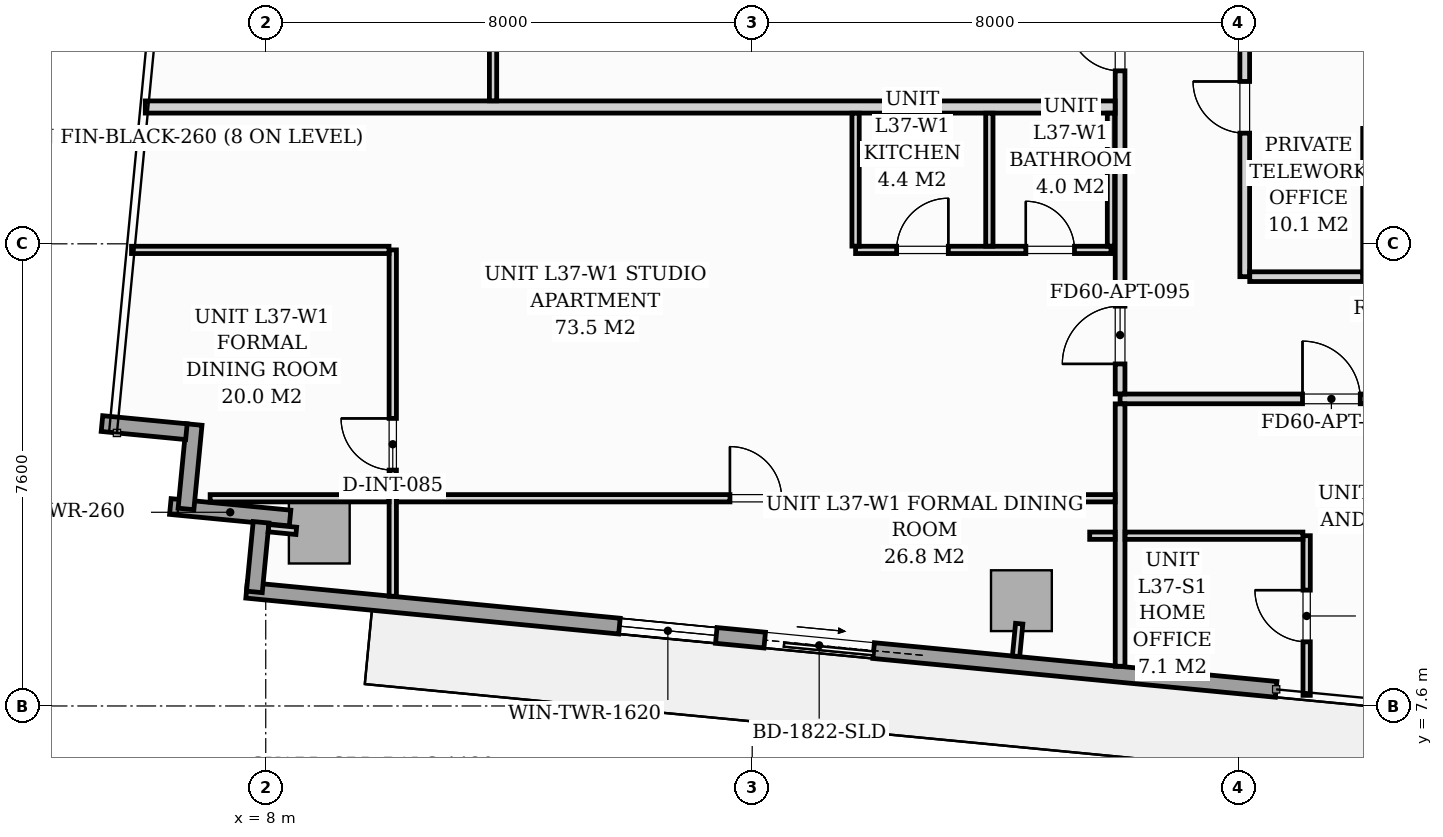
"""IFC4 building model, lengths in metres.
Left out: names, types, materials, properties, quantities, classifications, styles, units other than length and angle.
Written with IfcOpenShell. Run it as: python <this file> out.ifc"""

import sys

from ifc_helpers import new_model, si_unit, direction, frame, frame_2d, origin, origin_2d, place, context, subcontext, project, spatial, rectangle, extrude, source, transform, mapped, element, fill, save


model = new_model("IFC4")
c1 = context("Model", 3, precision=1e-05, world=origin(), true_north=direction((0.0, 1.0)))
c2 = subcontext(c1, "Body", "Model", "MODEL_VIEW")
j1 = project(units=[si_unit("LENGTHUNIT", "METRE"), si_unit("PLANEANGLEUNIT", "RADIAN")], contexts=[c1])
p1 = place(None, origin())
s1 = spatial("IfcSite", under=j1, at=p1, CompositionType="ELEMENT")
p2 = place(p1, origin())
s2 = spatial("IfcBuilding", under=s1, at=p2, CompositionType="ELEMENT")
p3 = place(p2, frame((0.0, 0.0, 131.0)))
s3 = spatial("IfcBuildingStorey", under=s2, at=p3, CompositionType="ELEMENT", Elevation=131.0)
m1 = source(origin(), c2, "Body", "SweptSolid", [
    extrude(rectangle(XDim=1.0, YDim=1.0, at=origin_2d()), origin(), (0.0, 0.0, 1.0), 3.196),
])
for number, where, z_axis, x_axis in (
    (1, (8.881, 10.443, 0.002), (0.0, 0.0, 1.0), (0.995, -0.096, 0.0)),
    (2, (20.427, 9.332, 0.002), (0.0, 0.0, 1.0), (0.995, -0.096, 0.0)),
):
    element("IfcColumn", number, at=place(p3, frame(where, z_axis=z_axis, x_axis=x_axis)), inside=s3, PredefinedType="COLUMN", context=c2, shape_type="MappedRepresentation", body=[
        mapped(m1, transform((0.0, 0.0, 0.0), scale=1.0)),
    ])
p4 = place(p3, frame((8.4, 10.69, 0.0), z_axis=(0.0, 0.0, 1.0), x_axis=(-0.995391147587, 0.095898192396, 0.0)))
e3 = element("IfcWall", 3, at=p4, inside=s3, PredefinedType="STANDARD", context=c2, shape_type="SweptSolid", body=[
    extrude(rectangle(XDim=1.978, YDim=0.26, at=frame_2d((0.989, 0.0))), origin(), (0.0, 0.0, 1.0), 2.94),
])
p5 = place(p3, frame((6.688, 10.84, 0.0), z_axis=(0.0, 0.0, 1.0), x_axis=(0.09589913835, 0.995391056452, 0.0)))
e4 = element("IfcWall", 4, at=p5, inside=s3, PredefinedType="STANDARD", context=c2, shape_type="SweptSolid", body=[
    extrude(rectangle(XDim=1.395, YDim=0.26, at=frame_2d((0.698, 0.0))), origin(), (0.0, 0.0, 1.0), 2.94),
])
p6 = place(p3, frame((6.695, 12.111, 0.0), z_axis=(0.0, 0.0, 1.0), x_axis=(-0.99540614245, 0.095742423056, 0.0)))
e5 = element("IfcWall", 5, at=p6, inside=s3, PredefinedType="STANDARD", context=c2, shape_type="SweptSolid", body=[
    extrude(rectangle(XDim=1.395, YDim=0.26, at=frame_2d((0.697, 0.0))), origin(), (0.0, 0.0, 1.0), 2.94),
])
p7 = place(p3, frame((24.617, 7.873, 0.0), z_axis=(0.0, 0.0, 1.0), x_axis=(-0.995395976631, 0.095848055311, 0.0)))
e6 = element("IfcWall", 6, at=p7, inside=s3, PredefinedType="STANDARD", context=c2, shape_type="SweptSolid", body=[
    extrude(rectangle(XDim=17.01, YDim=0.26, at=frame_2d((8.505, 0.0))), origin(), (0.0, 0.0, 1.0), 2.94),
])
p8 = place(p7, frame((6.65, 0.0, 0.0)))
e7 = element("IfcOpeningElement", 7, at=p8, cuts=e6, PredefinedType="OPENING", context=c2, shape_type="SweptSolid", body=[
    extrude(rectangle(XDim=1.8, YDim=2.06, at=frame_2d((0.9, 1.03))), frame((0.0, 0.14, 0.0), z_axis=(0.0, -1.0, 0.0), x_axis=(1.0, 0.0, 0.0)), (0.0, 0.0, 1.0), 0.28),
])
p9 = place(p7, frame((9.25, 0.0, 0.65)))
e8 = element("IfcOpeningElement", 8, at=p9, cuts=e6, PredefinedType="OPENING", context=c2, shape_type="SweptSolid", body=[
    extrude(rectangle(XDim=1.6, YDim=1.5, at=frame_2d((0.8, 0.75))), frame((0.0, 0.14, 0.0), z_axis=(0.0, -1.0, 0.0), x_axis=(1.0, 0.0, 0.0)), (0.0, 0.0, 1.0), 0.28),
])
p10 = place(p3, frame((7.813, 9.476, 0.0), z_axis=(0.0, 0.0, 1.0), x_axis=(0.09576095695, 0.995404359607, 0.0)))
e9 = element("IfcWall", 9, at=p10, inside=s3, PredefinedType="STANDARD", context=c2, shape_type="SweptSolid", body=[
    extrude(rectangle(XDim=1.15, YDim=0.26, at=frame_2d((0.575, 0.0))), origin(), (0.0, 0.0, 1.0), 2.94),
])
p11 = place(p3, frame((22.05, 12.65, 0.0), z_axis=(0.0, 0.0, 1.0), x_axis=(1.0, 0.0, 0.0)))
e10 = element("IfcWall", 10, at=p11, inside=s3, PredefinedType="PARTITIONING", context=c2, shape_type="SweptSolid", body=[
    extrude(rectangle(XDim=23.83, YDim=0.16, at=frame_2d((11.915, 0.0))), origin(), (0.0, 0.0, 1.0), 2.94),
])
p12 = place(p11, frame((3.0, 0.0, 0.0)))
e11 = element("IfcOpeningElement", 11, at=p12, cuts=e10, PredefinedType="OPENING", context=c2, shape_type="SweptSolid", body=[
    extrude(rectangle(XDim=0.95, YDim=2.06, at=frame_2d((0.475, 1.03))), frame((0.0, 0.09, 0.0), z_axis=(0.0, -1.0, 0.0), x_axis=(1.0, 0.0, 0.0)), (0.0, 0.0, 1.0), 0.18),
])
p13 = place(p11, frame((15.485, 0.0, 0.0)))
e12 = element("IfcOpeningElement", 12, at=p13, cuts=e10, PredefinedType="OPENING", context=c2, shape_type="SweptSolid", body=[
    extrude(rectangle(XDim=0.95, YDim=2.06, at=frame_2d((0.475, 1.03))), frame((0.0, 0.09, 0.0), z_axis=(0.0, -1.0, 0.0), x_axis=(1.0, 0.0, 0.0)), (0.0, 0.0, 1.0), 0.18),
])
p14 = place(p3, frame((22.05, 8.253, 0.0), z_axis=(0.0, 0.0, 1.0), x_axis=(0.0, 1.0, 0.0)))
e13 = element("IfcWall", 13, at=p14, inside=s3, PredefinedType="PARTITIONING", context=c2, shape_type="SweptSolid", body=[
    extrude(rectangle(XDim=4.315, YDim=0.16, at=frame_2d((2.157, 0.0))), origin(), (0.0, 0.0, 1.0), 2.94),
])
p15 = place(p3, frame((22.05, 12.732, 0.0), z_axis=(0.0, 0.0, 1.0), x_axis=(0.0, 1.0, 0.0)))
e14 = element("IfcWall", 14, at=p15, inside=s3, PredefinedType="PARTITIONING", context=c2, shape_type="SweptSolid", body=[
    extrude(rectangle(XDim=14.685, YDim=0.16, at=frame_2d((7.343, 0.0))), origin(), (0.0, 0.0, 1.0), 2.94),
])
p16 = place(p15, frame((0.493, 0.0, 0.0)))
e15 = element("IfcOpeningElement", 15, at=p16, cuts=e14, PredefinedType="OPENING", context=c2, shape_type="SweptSolid", body=[
    extrude(rectangle(XDim=0.95, YDim=2.06, at=frame_2d((0.475, 1.03))), frame((0.0, 0.09, 0.0), z_axis=(0.0, -1.0, 0.0), x_axis=(1.0, 0.0, 0.0)), (0.0, 0.0, 1.0), 0.18),
])
p17 = place(p15, frame((5.313, 0.0, 0.0)))
e16 = element("IfcOpeningElement", 16, at=p17, cuts=e14, PredefinedType="OPENING", context=c2, shape_type="SweptSolid", body=[
    extrude(rectangle(XDim=0.85, YDim=2.0, at=frame_2d((0.425, 1.0))), frame((0.0, 0.09, 0.0), z_axis=(0.0, -1.0, 0.0), x_axis=(1.0, 0.0, 0.0)), (0.0, 0.0, 1.0), 0.18),
])
p18 = place(p3, frame((25.118, 7.775, 0.0), z_axis=(0.0, 0.0, 1.0), x_axis=(0.0, 1.0, 0.0)))
e17 = element("IfcWall", 17, at=p18, inside=s3, PredefinedType="PARTITIONING", context=c2, shape_type="SweptSolid", body=[
    extrude(rectangle(XDim=2.625, YDim=0.12, at=frame_2d((1.312, 0.0))), origin(), (0.0, 0.0, 1.0), 2.94),
])
p19 = place(p18, frame((0.88, 0.0, 0.0)))
e18 = element("IfcOpeningElement", 18, at=p19, cuts=e17, PredefinedType="OPENING", context=c2, shape_type="SweptSolid", body=[
    extrude(rectangle(XDim=0.85, YDim=2.05, at=frame_2d((0.425, 1.025))), frame((0.0, 0.07, 0.0), z_axis=(0.0, -1.0, 0.0), x_axis=(1.0, 0.0, 0.0)), (0.0, 0.0, 1.0), 0.14),
])
p20 = place(p3, frame((21.55, 10.4, 0.0), z_axis=(0.0, 0.0, 1.0), x_axis=(1.0, 0.0, 0.0)))
e19 = element("IfcWall", 19, at=p20, inside=s3, PredefinedType="PARTITIONING", context=c2, shape_type="SweptSolid", body=[
    extrude(rectangle(XDim=0.418, YDim=0.12, at=frame_2d((0.209, 0.0))), origin(), (0.0, 0.0, 1.0), 2.94),
])
p21 = place(p3, frame((22.132, 10.4, 0.0), z_axis=(0.0, 0.0, 1.0), x_axis=(1.0, 0.0, 0.0)))
e20 = element("IfcWall", 20, at=p21, inside=s3, PredefinedType="PARTITIONING", context=c2, shape_type="SweptSolid", body=[
    extrude(rectangle(XDim=2.924, YDim=0.12, at=frame_2d((1.462, 0.0))), origin(), (0.0, 0.0, 1.0), 2.94),
])
p22 = place(p3, frame((6.019, 17.45, 0.0), z_axis=(0.0, 0.0, 1.0), x_axis=(1.0, 0.0, 0.0)))
e21 = element("IfcWall", 21, at=p22, inside=s3, PredefinedType="PARTITIONING", context=c2, shape_type="SweptSolid", body=[
    extrude(rectangle(XDim=15.949, YDim=0.2, at=frame_2d((7.975, 0.0))), origin(), (0.0, 0.0, 1.0), 2.94),
])
p23 = place(p3, frame((17.7, 15.1, 0.0), z_axis=(0.0, 0.0, 1.0), x_axis=(1.0, 0.0, 0.0)))
e22 = element("IfcWall", 22, at=p23, inside=s3, PredefinedType="PARTITIONING", context=c2, shape_type="SweptSolid", body=[
    extrude(rectangle(XDim=4.2, YDim=0.12, at=frame_2d((2.1, 0.0))), origin(), (0.0, 0.0, 1.0), 2.94),
])
p24 = place(p23, frame((0.675, 0.0, 0.0)))
e23 = element("IfcOpeningElement", 23, at=p24, cuts=e22, PredefinedType="OPENING", context=c2, shape_type="SweptSolid", body=[
    extrude(rectangle(XDim=0.85, YDim=2.05, at=frame_2d((0.425, 1.025))), frame((0.0, 0.07, 0.0), z_axis=(0.0, -1.0, 0.0), x_axis=(1.0, 0.0, 0.0)), (0.0, 0.0, 1.0), 0.14),
])
p25 = place(p23, frame((2.8, 0.0, 0.0)))
e24 = element("IfcOpeningElement", 24, at=p25, cuts=e22, PredefinedType="OPENING", context=c2, shape_type="SweptSolid", body=[
    extrude(rectangle(XDim=0.8, YDim=2.02, at=frame_2d((0.4, 1.01))), frame((0.0, 0.07, 0.0), z_axis=(0.0, -1.0, 0.0), x_axis=(1.0, 0.0, 0.0)), (0.0, 0.0, 1.0), 0.14),
])
for number, where, z_axis, x_axis in (
    (25, (17.7, 15.162, 0.0), (0.0, 0.0, 1.0), (0.0, 1.0, 0.0)),
    (26, (19.9, 15.162, 0.0), (0.0, 0.0, 1.0), (0.0, 1.0, 0.0)),
    (27, (21.9, 15.162, 0.0), (0.0, 0.0, 1.0), (0.0, 1.0, 0.0)),
):
    element("IfcWall", number, at=place(p3, frame(where, z_axis=z_axis, x_axis=x_axis)), inside=s3, PredefinedType="PARTITIONING", context=c2, shape_type="SweptSolid", body=[
        extrude(rectangle(XDim=2.186, YDim=0.12, at=frame_2d((1.093, 0.0))), origin(), (0.0, 0.0, 1.0), 2.94),
    ])
p26 = place(p3, frame((10.089, 9.405, 0.0), z_axis=(0.0, 0.0, 1.0), x_axis=(0.0, 1.0, 0.0)))
e28 = element("IfcWall", 28, at=p26, inside=s3, PredefinedType="PARTITIONING", context=c2, shape_type="SweptSolid", body=[
    extrude(rectangle(XDim=5.695, YDim=0.12, at=frame_2d((2.848, 0.0))), origin(), (0.0, 0.0, 1.0), 2.94),
])
p27 = place(p26, frame((2.074, 0.0, 0.0)))
e29 = element("IfcOpeningElement", 29, at=p27, cuts=e28, PredefinedType="OPENING", context=c2, shape_type="SweptSolid", body=[
    extrude(rectangle(XDim=0.85, YDim=2.05, at=frame_2d((0.425, 1.025))), frame((0.0, 0.07, 0.0), z_axis=(0.0, -1.0, 0.0), x_axis=(1.0, 0.0, 0.0)), (0.0, 0.0, 1.0), 0.14),
])
p28 = place(p3, frame((5.793, 15.1, 0.0), z_axis=(0.0, 0.0, 1.0), x_axis=(1.0, 0.0, 0.0)))
e30 = element("IfcWall", 30, at=p28, inside=s3, PredefinedType="PARTITIONING", context=c2, shape_type="SweptSolid", body=[
    extrude(rectangle(XDim=4.234, YDim=0.12, at=frame_2d((2.117, 0.0))), origin(), (0.0, 0.0, 1.0), 2.94),
])
p29 = place(p3, frame((7.086, 11.016, 0.0), z_axis=(0.0, 0.0, 1.0), x_axis=(1.0, 0.0, 0.0)))
e31 = element("IfcWall", 31, at=p29, inside=s3, PredefinedType="PARTITIONING", context=c2, shape_type="SweptSolid", body=[
    extrude(rectangle(XDim=2.941, YDim=0.12, at=frame_2d((1.471, 0.0))), origin(), (0.0, 0.0, 1.0), 2.94),
])
p30 = place(p3, frame((10.151, 11.016, 0.0), z_axis=(0.0, 0.0, 1.0), x_axis=(1.0, 0.0, 0.0)))
e32 = element("IfcWall", 32, at=p30, inside=s3, PredefinedType="PARTITIONING", context=c2, shape_type="SweptSolid", body=[
    extrude(rectangle(XDim=11.817, YDim=0.12, at=frame_2d((5.909, 0.0))), origin(), (0.0, 0.0, 1.0), 2.94),
])
p31 = place(p30, frame((5.483, 0.0, 0.0)))
e33 = element("IfcOpeningElement", 33, at=p31, cuts=e32, PredefinedType="OPENING", context=c2, shape_type="SweptSolid", body=[
    extrude(rectangle(XDim=0.85, YDim=2.05, at=frame_2d((0.425, 1.025))), frame((0.0, 0.07, 0.0), z_axis=(0.0, -1.0, 0.0), x_axis=(1.0, 0.0, 0.0)), (0.0, 0.0, 1.0), 0.14),
])
p32 = place(p3, frame((11.738, 17.552, 0.0), z_axis=(0.0, 0.0, 1.0), x_axis=(0.0, 1.0, 0.0)))
e34 = element("IfcWall", 34, at=p32, inside=s3, PredefinedType="PARTITIONING", context=c2, shape_type="SweptSolid", body=[
    extrude(rectangle(XDim=7.654, YDim=0.12, at=frame_2d((3.827, 0.0))), origin(), (0.0, 0.0, 1.0), 2.94),
])
p33 = place(p32, frame((3.402, 0.0, 0.0)))
e35 = element("IfcOpeningElement", 35, at=p33, cuts=e34, PredefinedType="OPENING", context=c2, shape_type="SweptSolid", body=[
    extrude(rectangle(XDim=0.85, YDim=2.05, at=frame_2d((0.425, 1.025))), frame((0.0, 0.07, 0.0), z_axis=(0.0, -1.0, 0.0), x_axis=(1.0, 0.0, 0.0)), (0.0, 0.0, 1.0), 0.14),
])
p34 = place(p3, frame((24.1, 14.66, 0.0), z_axis=(0.0, 0.0, 1.0), x_axis=(0.0, 1.0, 0.0)))
e36 = element("IfcWall", 36, at=p34, inside=s3, PredefinedType="PARTITIONING", context=c2, shape_type="SweptSolid", body=[
    extrude(rectangle(XDim=5.59, YDim=0.16, at=frame_2d((2.795, 0.0))), origin(), (0.0, 0.0, 1.0), 2.94),
])
p35 = place(p34, frame((2.36, 0.0, 0.0)))
e37 = element("IfcOpeningElement", 37, at=p35, cuts=e36, PredefinedType="OPENING", context=c2, shape_type="SweptSolid", body=[
    extrude(rectangle(XDim=0.85, YDim=2.0, at=frame_2d((0.425, 1.0))), frame((0.0, 0.09, 0.0), z_axis=(0.0, -1.0, 0.0), x_axis=(1.0, 0.0, 0.0)), (0.0, 0.0, 1.0), 0.18),
])
p36 = place(p3, frame((26.12, 14.66, 0.0), z_axis=(0.0, 0.0, 1.0), x_axis=(0.0, 1.0, 0.0)))
e38 = element("IfcWall", 38, at=p36, inside=s3, PredefinedType="PARTITIONING", context=c2, shape_type="SweptSolid", body=[
    extrude(rectangle(XDim=2.438, YDim=0.16, at=frame_2d((1.219, 0.0))), origin(), (0.0, 0.0, 1.0), 2.94),
])
p37 = place(p3, frame((24.182, 14.66, 0.0), z_axis=(0.0, 0.0, 1.0), x_axis=(1.0, 0.0, 0.0)))
e39 = element("IfcWall", 39, at=p37, inside=s3, PredefinedType="PARTITIONING", context=c2, shape_type="SweptSolid", body=[
    extrude(rectangle(XDim=1.856, YDim=0.16, at=frame_2d((0.928, 0.0))), origin(), (0.0, 0.0, 1.0), 2.94),
])
p38 = place(p3, frame((8.502, 10.48, 0.0), z_axis=(0.0, 0.0, 1.0), x_axis=(-0.995384576284, 0.09596637586, 0.0)))
e40 = element("IfcWall", 40, at=p38, inside=s3, PredefinedType="PARTITIONING", context=c2, shape_type="SweptSolid", body=[
    extrude(rectangle(XDim=0.458, YDim=0.12, at=frame_2d((0.229, 0.0))), origin(), (0.0, 0.0, 1.0), 2.94),
])
p39 = place(p3, frame((20.391, 8.953, 0.0), z_axis=(0.0, 0.0, 1.0), x_axis=(-0.096222656154, -0.995359834654, 0.0)))
e41 = element("IfcWall", 41, at=p39, inside=s3, PredefinedType="PARTITIONING", context=c2, shape_type="SweptSolid", body=[
    extrude(rectangle(XDim=0.538, YDim=0.12, at=frame_2d((0.269, 0.0))), origin(), (0.0, 0.0, 1.0), 2.94),
])
m2 = source(origin(), c2, "Body", "SweptSolid", [
    extrude(rectangle(XDim=1.8, YDim=2.06, at=frame_2d((0.9, 1.03))), frame((0.0, 0.025, 0.0), z_axis=(0.0, -1.0, 0.0), x_axis=(1.0, 0.0, 0.0)), (0.0, 0.0, 1.0), 0.05),
])
p40 = place(p8, origin())
e42 = element("IfcDoor", 42, at=p40, inside=s3, OperationType="SLIDING_TO_LEFT", PredefinedType="DOOR", context=c2, shape_type="MappedRepresentation", body=[
    mapped(m2, transform((0.0, 0.0, 0.0), scale=1.0)),
])
fill(e7, e42)
m3 = source(origin(), c2, "Body", "SweptSolid", [
    extrude(rectangle(XDim=1.6, YDim=1.5, at=frame_2d((0.8, 0.75))), frame((0.0, 0.03, 0.0), z_axis=(0.0, -1.0, 0.0), x_axis=(1.0, 0.0, 0.0)), (0.0, 0.0, 1.0), 0.06),
])
p41 = place(p9, origin())
e43 = element("IfcWindow", 43, at=p41, inside=s3, PartitioningType="SINGLE_PANEL", PredefinedType="WINDOW", context=c2, shape_type="MappedRepresentation", body=[
    mapped(m3, transform((0.0, 0.0, 0.0), scale=1.0)),
])
fill(e8, e43)
m4 = source(origin(), c2, "Body", "SweptSolid", [
    extrude(rectangle(XDim=0.85, YDim=2.05, at=frame_2d((0.425, 1.025))), frame((0.0, 0.025, 0.0), z_axis=(0.0, -1.0, 0.0), x_axis=(1.0, 0.0, 0.0)), (0.0, 0.0, 1.0), 0.05),
])
p42 = place(p19, origin())
e44 = element("IfcDoor", 44, at=p42, inside=s3, OperationType="SINGLE_SWING_RIGHT", PredefinedType="DOOR", context=c2, shape_type="MappedRepresentation", body=[
    mapped(m4, transform((0.0, 0.0, 0.0), scale=1.0)),
])
fill(e18, e44)
m5 = source(origin(), c2, "Body", "SweptSolid", [
    extrude(rectangle(XDim=0.95, YDim=2.06, at=frame_2d((0.475, 1.03))), frame((0.0, 0.025, 0.0), z_axis=(0.0, -1.0, 0.0), x_axis=(1.0, 0.0, 0.0)), (0.0, 0.0, 1.0), 0.05),
])
p43 = place(p12, origin())
e45 = element("IfcDoor", 45, at=p43, inside=s3, OperationType="SINGLE_SWING_LEFT", PredefinedType="DOOR", context=c2, shape_type="MappedRepresentation", body=[
    mapped(m5, transform((0.0, 0.0, 0.0), scale=1.0)),
])
fill(e11, e45)
p44 = place(p16, origin())
e46 = element("IfcDoor", 46, at=p44, inside=s3, OperationType="SINGLE_SWING_LEFT", PredefinedType="DOOR", context=c2, shape_type="MappedRepresentation", body=[
    mapped(m5, transform((0.0, 0.0, 0.0), scale=1.0)),
])
fill(e15, e46)
p45 = place(p27, origin())
e47 = element("IfcDoor", 47, at=p45, inside=s3, OperationType="SINGLE_SWING_RIGHT", PredefinedType="DOOR", context=c2, shape_type="MappedRepresentation", body=[
    mapped(m4, transform((0.0, 0.0, 0.0), scale=1.0)),
])
fill(e29, e47)
p46 = place(p31, origin())
e48 = element("IfcDoor", 48, at=p46, inside=s3, OperationType="SINGLE_SWING_LEFT", PredefinedType="DOOR", context=c2, shape_type="MappedRepresentation", body=[
    mapped(m4, transform((0.0, 0.0, 0.0), scale=1.0)),
])
fill(e33, e48)
p47 = place(p24, origin())
e49 = element("IfcDoor", 49, at=p47, inside=s3, OperationType="SINGLE_SWING_RIGHT", PredefinedType="DOOR", context=c2, shape_type="MappedRepresentation", body=[
    mapped(m4, transform((0.0, 0.0, 0.0), scale=1.0)),
])
fill(e23, e49)
m6 = source(origin(), c2, "Body", "SweptSolid", [
    extrude(rectangle(XDim=0.8, YDim=2.02, at=frame_2d((0.4, 1.01))), frame((0.0, 0.025, 0.0), z_axis=(0.0, -1.0, 0.0), x_axis=(1.0, 0.0, 0.0)), (0.0, 0.0, 1.0), 0.05),
])
p48 = place(p25, origin())
e50 = element("IfcDoor", 50, at=p48, inside=s3, OperationType="SINGLE_SWING_LEFT", PredefinedType="DOOR", context=c2, shape_type="MappedRepresentation", body=[
    mapped(m6, transform((0.0, 0.0, 0.0), scale=1.0)),
])
fill(e24, e50)
m7 = source(origin(), c2, "Body", "SweptSolid", [
    extrude(rectangle(XDim=0.85, YDim=2.0, at=frame_2d((0.425, 1.0))), frame((0.0, 0.025, 0.0), z_axis=(0.0, -1.0, 0.0), x_axis=(1.0, 0.0, 0.0)), (0.0, 0.0, 1.0), 0.05),
])
p49 = place(p17, origin())
e51 = element("IfcDoor", 51, at=p49, inside=s3, OperationType="SINGLE_SWING_RIGHT", PredefinedType="DOOR", context=c2, shape_type="MappedRepresentation", body=[
    mapped(m7, transform((0.0, 0.0, 0.0), scale=1.0)),
])
fill(e16, e51)
p50 = place(p35, origin())
e52 = element("IfcDoor", 52, at=p50, inside=s3, OperationType="SINGLE_SWING_RIGHT", PredefinedType="DOOR", context=c2, shape_type="MappedRepresentation", body=[
    mapped(m7, transform((0.0, 0.0, 0.0), scale=1.0)),
])
fill(e37, e52)
save(model, sys.argv[1])
